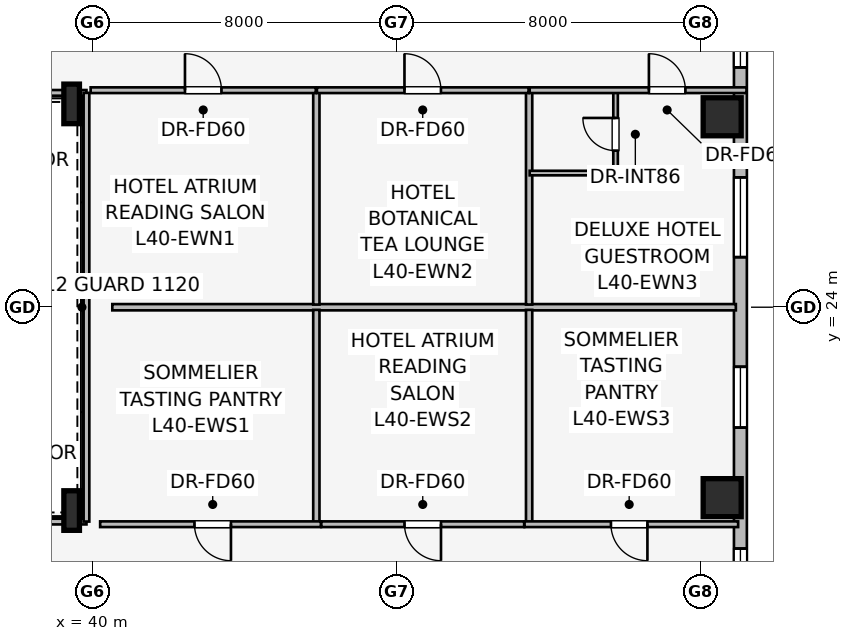
"""IFC4 building model, lengths in metres.
Left out: names, types, materials, properties, quantities, classifications, styles, units other than length and angle.
Written with IfcOpenShell. Run it as: python <this file> out.ifc"""

import sys

from ifc_helpers import new_model, si_unit, direction, frame, frame_2d, origin, origin_2d, place, context, subcontext, project, spatial, rectangle, i_section, extrude, element, fill, save


model = new_model("IFC4")
c1 = context("Model", 3, precision=1e-05, world=origin(), true_north=direction((0.0, 1.0)))
c2 = subcontext(c1, "Body", "Model", "MODEL_VIEW")
j1 = project(units=[si_unit("LENGTHUNIT", "METRE"), si_unit("PLANEANGLEUNIT", "RADIAN")], contexts=[c1])
p1 = place(None, origin())
s1 = spatial("IfcSite", under=j1, at=p1, CompositionType="ELEMENT")
p2 = place(p1, origin())
s2 = spatial("IfcBuilding", under=s1, at=p2, CompositionType="ELEMENT")
p3 = place(p2, frame((0.0, 0.0, 149.85)))
s3 = spatial("IfcBuildingStorey", under=s2, at=p3, CompositionType="ELEMENT", Elevation=149.85)
for number, where, z_axis, x_axis in (
    (1, (56.568, 18.989, 0.0), (0.0, 0.0, 1.0), (1.0, 0.0, 0.0)),
    (2, (56.568, 29.011, 0.0), (0.0, 0.0, 1.0), (1.0, 0.0, 0.0)),
):
    element("IfcColumn", number, at=place(p3, frame(where, z_axis=z_axis, x_axis=x_axis)), inside=s3, PredefinedType="COLUMN", context=c2, shape_type="SweptSolid", body=[
        extrude(rectangle(XDim=1.0, YDim=1.0, at=origin_2d()), origin(), (0.0, 0.0, 1.0), 3.45),
    ])
for number, where, z_axis, x_axis in (
    (3, (39.45, 18.65, 0.0), (0.0, 0.0, 1.0), (1.0, 0.0, 0.0)),
    (4, (39.45, 29.35, 0.0), (0.0, 0.0, 1.0), (1.0, 0.0, 0.0)),
):
    element("IfcColumn", number, at=place(p3, frame(where, z_axis=z_axis, x_axis=x_axis)), inside=s3, PredefinedType="COLUMN", context=c2, shape_type="SweptSolid", body=[
        extrude(i_section(OverallWidth=0.41, OverallDepth=1.041, WebThickness=0.031, FlangeThickness=0.056, at=origin_2d()), origin(), (0.0, 0.0, 1.0), 3.45),
    ])
p4 = place(p3, frame((57.048, 32.352, 0.0), z_axis=(0.0, 0.0, 1.0), x_axis=(0.0, -1.0, 0.0)))
e5 = element("IfcWall", 5, at=p4, inside=s3, PredefinedType="STANDARD", context=c2, shape_type="SweptSolid", body=[
    extrude(rectangle(XDim=16.704, YDim=0.34, at=frame_2d((8.352, 0.0))), origin(), (0.0, 0.0, 1.0), 3.19),
])
p5 = place(p4, frame((0.992, 0.0, 0.75)))
e6 = element("IfcOpeningElement", 6, at=p5, cuts=e5, PredefinedType="OPENING", context=c2, shape_type="SweptSolid", body=[
    extrude(rectangle(XDim=1.05, YDim=1.4, at=frame_2d((0.525, 0.7))), frame((0.0, 0.18, 0.0), z_axis=(0.0, -1.0, 0.0), x_axis=(1.0, 0.0, 0.0)), (0.0, 0.0, 1.0), 0.36),
])
p6 = place(p4, frame((4.935, 0.0, 0.75)))
e7 = element("IfcOpeningElement", 7, at=p6, cuts=e5, PredefinedType="OPENING", context=c2, shape_type="SweptSolid", body=[
    extrude(rectangle(XDim=2.1, YDim=1.5, at=frame_2d((1.05, 0.75))), frame((0.0, 0.18, 0.0), z_axis=(0.0, -1.0, 0.0), x_axis=(1.0, 0.0, 0.0)), (0.0, 0.0, 1.0), 0.36),
])
p7 = place(p4, frame((9.919, 0.0, 0.75)))
e8 = element("IfcOpeningElement", 8, at=p7, cuts=e5, PredefinedType="OPENING", context=c2, shape_type="SweptSolid", body=[
    extrude(rectangle(XDim=1.6, YDim=1.55, at=frame_2d((0.8, 0.775))), frame((0.0, 0.18, 0.0), z_axis=(0.0, -1.0, 0.0), x_axis=(1.0, 0.0, 0.0)), (0.0, 0.0, 1.0), 0.36),
])
p8 = place(p4, frame((14.702, 0.0, 0.75)))
e9 = element("IfcOpeningElement", 9, at=p8, cuts=e5, PredefinedType="OPENING", context=c2, shape_type="SweptSolid", body=[
    extrude(rectangle(XDim=1.05, YDim=1.4, at=frame_2d((0.525, 0.7))), frame((0.0, 0.18, 0.0), z_axis=(0.0, -1.0, 0.0), x_axis=(1.0, 0.0, 0.0)), (0.0, 0.0, 1.0), 0.36),
])
p9 = place(p3, frame((27.675, 18.36, 0.0), z_axis=(0.0, 0.0, 1.0), x_axis=(1.0, 0.0, 0.0)))
e10 = element("IfcWall", 10, at=p9, inside=s3, PredefinedType="PARTITIONING", context=c2, shape_type="SweptSolid", body=[
    extrude(rectangle(XDim=12.165, YDim=0.15, at=frame_2d((6.083, 0.0))), origin(), (0.0, 0.0, 1.0), 2.331),
])
p10 = place(p3, frame((39.84, 29.64, 0.0), z_axis=(0.0, 0.0, 1.0), x_axis=(-1.0, 0.0, 0.0)))
e11 = element("IfcWall", 11, at=p10, inside=s3, PredefinedType="PARTITIONING", context=c2, shape_type="SweptSolid", body=[
    extrude(rectangle(XDim=12.2, YDim=0.15, at=frame_2d((6.1, 0.0))), origin(), (0.0, 0.0, 1.0), 2.331),
])
p11 = place(p3, frame((39.84, 18.36, 0.0), z_axis=(0.0, 0.0, 1.0), x_axis=(0.0, 1.0, 0.0)))
e12 = element("IfcWall", 12, at=p11, inside=s3, PredefinedType="PARTITIONING", context=c2, shape_type="SweptSolid", body=[
    extrude(rectangle(XDim=11.28, YDim=0.15, at=frame_2d((5.64, 0.0))), origin(), (0.0, 0.0, 1.0), 3.19),
])
p12 = place(p3, frame((40.52, 24.0, 0.0), z_axis=(0.0, 0.0, 1.0), x_axis=(1.0, 0.0, 0.0)))
e13 = element("IfcWall", 13, at=p12, inside=s3, PredefinedType="PARTITIONING", context=c2, shape_type="SweptSolid", body=[
    extrude(rectangle(XDim=16.408, YDim=0.165, at=frame_2d((8.204, 0.0))), origin(), (0.0, 0.0, 1.0), 3.19),
])
p13 = place(p3, frame((45.889, 24.07, 0.0), z_axis=(0.0, 0.0, 1.0), x_axis=(0.0, 1.0, 0.0)))
e14 = element("IfcWall", 14, at=p13, inside=s3, PredefinedType="PARTITIONING", context=c2, shape_type="SweptSolid", body=[
    extrude(rectangle(XDim=5.64, YDim=0.165, at=frame_2d((2.82, 0.0))), origin(), (0.0, 0.0, 1.0), 3.19),
])
p14 = place(p3, frame((51.488, 24.07, 0.0), z_axis=(0.0, 0.0, 1.0), x_axis=(0.0, 1.0, 0.0)))
e15 = element("IfcWall", 15, at=p14, inside=s3, PredefinedType="PARTITIONING", context=c2, shape_type="SweptSolid", body=[
    extrude(rectangle(XDim=5.64, YDim=0.165, at=frame_2d((2.82, 0.0))), origin(), (0.0, 0.0, 1.0), 2.733),
])
p15 = place(p3, frame((39.95, 29.71, 0.0), z_axis=(0.0, 0.0, 1.0), x_axis=(1.0, 0.0, 0.0)))
e16 = element("IfcWall", 16, at=p15, inside=s3, PredefinedType="PARTITIONING", context=c2, shape_type="SweptSolid", body=[
    extrude(rectangle(XDim=5.924, YDim=0.15, at=frame_2d((2.962, 0.0))), origin(), (0.0, 0.0, 1.0), 3.19),
])
p16 = place(p15, frame((2.482, 0.0, 0.0)))
e17 = element("IfcOpeningElement", 17, at=p16, cuts=e16, PredefinedType="OPENING", context=c2, shape_type="SweptSolid", body=[
    extrude(rectangle(XDim=0.96, YDim=2.0, at=frame_2d((0.48, 1.0))), frame((0.0, 0.085, 0.0), z_axis=(0.0, -1.0, 0.0), x_axis=(1.0, 0.0, 0.0)), (0.0, 0.0, 1.0), 0.17),
])
p17 = place(p3, frame((45.904, 29.71, 0.0), z_axis=(0.0, 0.0, 1.0), x_axis=(1.0, 0.0, 0.0)))
e18 = element("IfcWall", 18, at=p17, inside=s3, PredefinedType="PARTITIONING", context=c2, shape_type="SweptSolid", body=[
    extrude(rectangle(XDim=5.569, YDim=0.15, at=frame_2d((2.784, 0.0))), origin(), (0.0, 0.0, 1.0), 3.19),
])
p18 = place(p17, frame((2.304, 0.0, 0.0)))
e19 = element("IfcOpeningElement", 19, at=p18, cuts=e18, PredefinedType="OPENING", context=c2, shape_type="SweptSolid", body=[
    extrude(rectangle(XDim=0.96, YDim=2.0, at=frame_2d((0.48, 1.0))), frame((0.0, 0.085, 0.0), z_axis=(0.0, -1.0, 0.0), x_axis=(1.0, 0.0, 0.0)), (0.0, 0.0, 1.0), 0.17),
])
p19 = place(p3, frame((53.763, 27.47, 0.0), z_axis=(0.0, 0.0, 1.0), x_axis=(0.0, 1.0, 0.0)))
e20 = element("IfcWall", 20, at=p19, inside=s3, PredefinedType="PARTITIONING", context=c2, shape_type="SweptSolid", body=[
    extrude(rectangle(XDim=2.24, YDim=0.12, at=frame_2d((1.12, 0.0))), origin(), (0.0, 0.0, 1.0), 3.19),
])
p20 = place(p19, frame((0.65, 0.0, 0.0)))
e21 = element("IfcOpeningElement", 21, at=p20, cuts=e20, PredefinedType="OPENING", context=c2, shape_type="SweptSolid", body=[
    extrude(rectangle(XDim=0.86, YDim=2.0, at=frame_2d((0.43, 1.0))), frame((0.0, 0.07, 0.0), z_axis=(0.0, -1.0, 0.0), x_axis=(1.0, 0.0, 0.0)), (0.0, 0.0, 1.0), 0.14),
])
p21 = place(p3, frame((51.503, 27.53, 0.0), z_axis=(0.0, 0.0, 1.0), x_axis=(1.0, 0.0, 0.0)))
e22 = element("IfcWall", 22, at=p21, inside=s3, PredefinedType="PARTITIONING", context=c2, shape_type="SweptSolid", body=[
    extrude(rectangle(XDim=2.32, YDim=0.12, at=frame_2d((1.16, 0.0))), origin(), (0.0, 0.0, 1.0), 3.19),
])
p22 = place(p3, frame((51.503, 29.71, 0.0), z_axis=(0.0, 0.0, 1.0), x_axis=(1.0, 0.0, 0.0)))
e23 = element("IfcWall", 23, at=p22, inside=s3, PredefinedType="PARTITIONING", context=c2, shape_type="SweptSolid", body=[
    extrude(rectangle(XDim=5.705, YDim=0.15, at=frame_2d((2.853, 0.0))), origin(), (0.0, 0.0, 1.0), 3.19),
])
p23 = place(p22, frame((3.137, 0.0, 0.0)))
e24 = element("IfcOpeningElement", 24, at=p23, cuts=e23, PredefinedType="OPENING", context=c2, shape_type="SweptSolid", body=[
    extrude(rectangle(XDim=0.96, YDim=2.0, at=frame_2d((0.48, 1.0))), frame((0.0, 0.085, 0.0), z_axis=(0.0, -1.0, 0.0), x_axis=(1.0, 0.0, 0.0)), (0.0, 0.0, 1.0), 0.17),
])
p24 = place(p3, frame((45.889, 18.29, 0.0), z_axis=(0.0, 0.0, 1.0), x_axis=(0.0, 1.0, 0.0)))
e25 = element("IfcWall", 25, at=p24, inside=s3, PredefinedType="PARTITIONING", context=c2, shape_type="SweptSolid", body=[
    extrude(rectangle(XDim=5.64, YDim=0.165, at=frame_2d((2.82, 0.0))), origin(), (0.0, 0.0, 1.0), 3.19),
])
p25 = place(p3, frame((51.488, 18.29, 0.0), z_axis=(0.0, 0.0, 1.0), x_axis=(0.0, 1.0, 0.0)))
e26 = element("IfcWall", 26, at=p25, inside=s3, PredefinedType="PARTITIONING", context=c2, shape_type="SweptSolid", body=[
    extrude(rectangle(XDim=5.64, YDim=0.165, at=frame_2d((2.82, 0.0))), origin(), (0.0, 0.0, 1.0), 2.733),
])
p26 = place(p3, frame((46.009, 18.29, 0.0), z_axis=(0.0, 0.0, 1.0), x_axis=(-1.0, 0.0, 0.0)))
e27 = element("IfcWall", 27, at=p26, inside=s3, PredefinedType="PARTITIONING", context=c2, shape_type="SweptSolid", body=[
    extrude(rectangle(XDim=5.809, YDim=0.15, at=frame_2d((2.905, 0.0))), origin(), (0.0, 0.0, 1.0), 3.19),
])
p27 = place(p26, frame((2.367, 0.0, 0.0)))
e28 = element("IfcOpeningElement", 28, at=p27, cuts=e27, PredefinedType="OPENING", context=c2, shape_type="SweptSolid", body=[
    extrude(rectangle(XDim=0.96, YDim=2.0, at=frame_2d((0.48, 1.0))), frame((0.0, 0.085, 0.0), z_axis=(0.0, -1.0, 0.0), x_axis=(1.0, 0.0, 0.0)), (0.0, 0.0, 1.0), 0.17),
])
p28 = place(p3, frame((51.358, 18.29, 0.0), z_axis=(0.0, 0.0, 1.0), x_axis=(-1.0, 0.0, 0.0)))
e29 = element("IfcWall", 29, at=p28, inside=s3, PredefinedType="PARTITIONING", context=c2, shape_type="SweptSolid", body=[
    extrude(rectangle(XDim=5.339, YDim=0.15, at=frame_2d((2.669, 0.0))), origin(), (0.0, 0.0, 1.0), 3.19),
])
p29 = place(p28, frame((2.189, 0.0, 0.0)))
e30 = element("IfcOpeningElement", 30, at=p29, cuts=e29, PredefinedType="OPENING", context=c2, shape_type="SweptSolid", body=[
    extrude(rectangle(XDim=0.96, YDim=2.0, at=frame_2d((0.48, 1.0))), frame((0.0, 0.085, 0.0), z_axis=(0.0, -1.0, 0.0), x_axis=(1.0, 0.0, 0.0)), (0.0, 0.0, 1.0), 0.17),
])
p30 = place(p3, frame((56.988, 18.29, 0.0), z_axis=(0.0, 0.0, 1.0), x_axis=(-1.0, 0.0, 0.0)))
e31 = element("IfcWall", 31, at=p30, inside=s3, PredefinedType="PARTITIONING", context=c2, shape_type="SweptSolid", body=[
    extrude(rectangle(XDim=5.62, YDim=0.15, at=frame_2d((2.81, 0.0))), origin(), (0.0, 0.0, 1.0), 3.19),
])
p31 = place(p30, frame((2.387, 0.0, 0.0)))
e32 = element("IfcOpeningElement", 32, at=p31, cuts=e31, PredefinedType="OPENING", context=c2, shape_type="SweptSolid", body=[
    extrude(rectangle(XDim=0.96, YDim=2.0, at=frame_2d((0.48, 1.0))), frame((0.0, 0.085, 0.0), z_axis=(0.0, -1.0, 0.0), x_axis=(1.0, 0.0, 0.0)), (0.0, 0.0, 1.0), 0.17),
])
p32 = place(p5, origin())
e33 = element("IfcWindow", 33, at=p32, inside=s3, PartitioningType="SINGLE_PANEL", PredefinedType="WINDOW", context=c2, shape_type="SweptSolid", body=[
    extrude(rectangle(XDim=1.05, YDim=1.4, at=frame_2d((0.525, 0.7))), frame((0.0, 0.03, 0.0), z_axis=(0.0, -1.0, 0.0), x_axis=(1.0, 0.0, 0.0)), (0.0, 0.0, 1.0), 0.06),
])
fill(e6, e33)
p33 = place(p6, origin())
e34 = element("IfcWindow", 34, at=p33, inside=s3, PartitioningType="SINGLE_PANEL", PredefinedType="WINDOW", context=c2, shape_type="SweptSolid", body=[
    extrude(rectangle(XDim=2.1, YDim=1.5, at=frame_2d((1.05, 0.75))), frame((0.0, 0.03, 0.0), z_axis=(0.0, -1.0, 0.0), x_axis=(1.0, 0.0, 0.0)), (0.0, 0.0, 1.0), 0.06),
])
fill(e7, e34)
p34 = place(p7, origin())
e35 = element("IfcWindow", 35, at=p34, inside=s3, PartitioningType="SINGLE_PANEL", PredefinedType="WINDOW", context=c2, shape_type="SweptSolid", body=[
    extrude(rectangle(XDim=1.6, YDim=1.55, at=frame_2d((0.8, 0.775))), frame((0.0, 0.03, 0.0), z_axis=(0.0, -1.0, 0.0), x_axis=(1.0, 0.0, 0.0)), (0.0, 0.0, 1.0), 0.06),
])
fill(e8, e35)
p35 = place(p8, origin())
e36 = element("IfcWindow", 36, at=p35, inside=s3, PartitioningType="SINGLE_PANEL", PredefinedType="WINDOW", context=c2, shape_type="SweptSolid", body=[
    extrude(rectangle(XDim=1.05, YDim=1.4, at=frame_2d((0.525, 0.7))), frame((0.0, 0.03, 0.0), z_axis=(0.0, -1.0, 0.0), x_axis=(1.0, 0.0, 0.0)), (0.0, 0.0, 1.0), 0.06),
])
fill(e9, e36)
p36 = place(p16, origin())
e37 = element("IfcDoor", 37, at=p36, inside=s3, OperationType="SINGLE_SWING_LEFT", PredefinedType="DOOR", context=c2, shape_type="SweptSolid", body=[
    extrude(rectangle(XDim=0.96, YDim=2.0, at=frame_2d((0.48, 1.0))), frame((0.0, 0.025, 0.0), z_axis=(0.0, -1.0, 0.0), x_axis=(1.0, 0.0, 0.0)), (0.0, 0.0, 1.0), 0.05),
])
fill(e17, e37)
p37 = place(p18, origin())
e38 = element("IfcDoor", 38, at=p37, inside=s3, OperationType="SINGLE_SWING_LEFT", PredefinedType="DOOR", context=c2, shape_type="SweptSolid", body=[
    extrude(rectangle(XDim=0.96, YDim=2.0, at=frame_2d((0.48, 1.0))), frame((0.0, 0.025, 0.0), z_axis=(0.0, -1.0, 0.0), x_axis=(1.0, 0.0, 0.0)), (0.0, 0.0, 1.0), 0.05),
])
fill(e19, e38)
p38 = place(p20, origin())
e39 = element("IfcDoor", 39, at=p38, inside=s3, OperationType="SINGLE_SWING_RIGHT", PredefinedType="DOOR", context=c2, shape_type="SweptSolid", body=[
    extrude(rectangle(XDim=0.86, YDim=2.0, at=frame_2d((0.43, 1.0))), frame((0.0, 0.025, 0.0), z_axis=(0.0, -1.0, 0.0), x_axis=(1.0, 0.0, 0.0)), (0.0, 0.0, 1.0), 0.05),
])
fill(e21, e39)
p39 = place(p23, origin())
e40 = element("IfcDoor", 40, at=p39, inside=s3, OperationType="SINGLE_SWING_LEFT", PredefinedType="DOOR", context=c2, shape_type="SweptSolid", body=[
    extrude(rectangle(XDim=0.96, YDim=2.0, at=frame_2d((0.48, 1.0))), frame((0.0, 0.025, 0.0), z_axis=(0.0, -1.0, 0.0), x_axis=(1.0, 0.0, 0.0)), (0.0, 0.0, 1.0), 0.05),
])
fill(e24, e40)
p40 = place(p27, origin())
e41 = element("IfcDoor", 41, at=p40, inside=s3, OperationType="SINGLE_SWING_LEFT", PredefinedType="DOOR", context=c2, shape_type="SweptSolid", body=[
    extrude(rectangle(XDim=0.96, YDim=2.0, at=frame_2d((0.48, 1.0))), frame((0.0, 0.025, 0.0), z_axis=(0.0, -1.0, 0.0), x_axis=(1.0, 0.0, 0.0)), (0.0, 0.0, 1.0), 0.05),
])
fill(e28, e41)
p41 = place(p29, origin())
e42 = element("IfcDoor", 42, at=p41, inside=s3, OperationType="SINGLE_SWING_LEFT", PredefinedType="DOOR", context=c2, shape_type="SweptSolid", body=[
    extrude(rectangle(XDim=0.96, YDim=2.0, at=frame_2d((0.48, 1.0))), frame((0.0, 0.025, 0.0), z_axis=(0.0, -1.0, 0.0), x_axis=(1.0, 0.0, 0.0)), (0.0, 0.0, 1.0), 0.05),
])
fill(e30, e42)
p42 = place(p31, origin())
e43 = element("IfcDoor", 43, at=p42, inside=s3, OperationType="SINGLE_SWING_LEFT", PredefinedType="DOOR", context=c2, shape_type="SweptSolid", body=[
    extrude(rectangle(XDim=0.96, YDim=2.0, at=frame_2d((0.48, 1.0))), frame((0.0, 0.025, 0.0), z_axis=(0.0, -1.0, 0.0), x_axis=(1.0, 0.0, 0.0)), (0.0, 0.0, 1.0), 0.05),
])
fill(e32, e43)
save(model, sys.argv[1])
